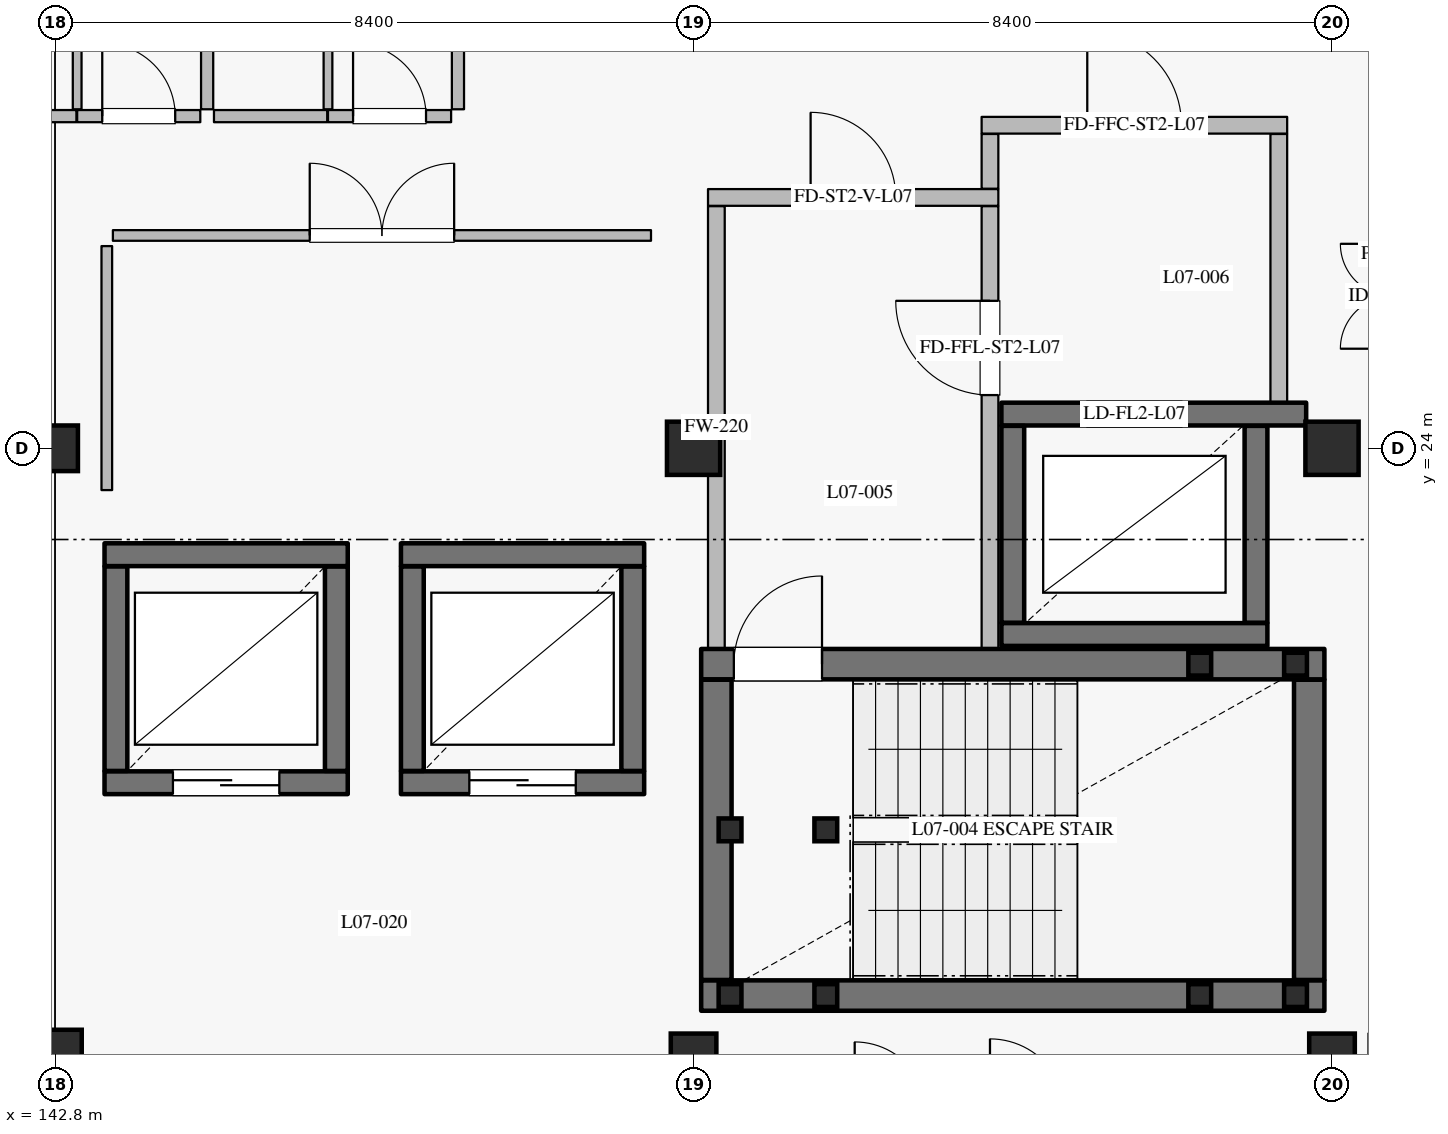
"""IFC4 building model, lengths in metres.
Left out: names, types, materials, properties, quantities, classifications, styles, units other than length and angle.
Written with IfcOpenShell. Run it as: python <this file> out.ifc"""

import sys

from ifc_helpers import new_model, si_unit, direction, frame, frame_2d, origin, origin_2d, place, context, subcontext, project, spatial, rectangle, hollow_rectangle, extrude, element, fill, save


model = new_model("IFC4")
c1 = context("Model", 3, precision=1e-05, world=origin(), true_north=direction((0.0, 1.0)))
c2 = subcontext(c1, "Body", "Model", "MODEL_VIEW")
j1 = project(units=[si_unit("LENGTHUNIT", "METRE"), si_unit("PLANEANGLEUNIT", "RADIAN")], contexts=[c1])
p1 = place(None, origin())
s1 = spatial("IfcSite", under=j1, at=p1, CompositionType="ELEMENT")
p2 = place(p1, origin())
s2 = spatial("IfcBuilding", under=s1, at=p2, CompositionType="ELEMENT")
p3 = place(p2, frame((0.0, 0.0, 32.4)))
s3 = spatial("IfcBuildingStorey", under=s2, at=p3, CompositionType="ELEMENT", Elevation=32.4)
for number, where, z_axis, x_axis in (
    (1, (142.8, 16.0, 0.0), (0.0, 0.0, 1.0), (1.0, 0.0, 0.0)),
    (2, (151.2, 24.0, 0.0), (0.0, 0.0, 1.0), (1.0, 0.0, 0.0)),
    (3, (159.6, 24.0, 0.0), (0.0, 0.0, 1.0), (1.0, 0.0, 0.0)),
):
    element("IfcColumn", number, at=place(p3, frame(where, z_axis=z_axis, x_axis=x_axis)), inside=s3, PredefinedType="COLUMN", context=c2, shape_type="SweptSolid", body=[
        extrude(rectangle(XDim=0.7, YDim=0.7, at=origin_2d()), origin(), (0.0, 0.0, 1.0), 3.6),
    ])
for number, where, z_axis, x_axis in (
    (4, (142.8, 24.0, 0.0), (0.0, 0.0, 1.0), (1.0, 0.0, 0.0)),
    (5, (151.2, 16.0, 0.0), (0.0, 0.0, 1.0), (1.0, 0.0, 0.0)),
    (6, (159.6, 16.0, 0.0), (0.0, 0.0, 1.0), (1.0, 0.0, 0.0)),
):
    element("IfcColumn", number, at=place(p3, frame(where, z_axis=z_axis, x_axis=x_axis)), inside=s3, PredefinedType="COLUMN", context=c2, shape_type="SweptSolid", body=[
        extrude(rectangle(XDim=0.6, YDim=0.6, at=origin_2d()), origin(), (0.0, 0.0, 1.0), 3.6),
    ])
p4 = place(p3, frame((155.25, 21.55, 0.0), z_axis=(0.0, 0.0, 1.0), x_axis=(1.0, 0.0, 0.0)))
e7 = element("IfcWall", 7, at=p4, inside=s3, PredefinedType="SHEAR", context=c2, shape_type="SweptSolid", body=[
    extrude(rectangle(XDim=3.5, YDim=0.3, at=frame_2d((1.75, 0.0))), origin(), (0.0, 0.0, 1.0), 3.335),
])
p5 = place(p3, frame((158.6, 21.705, 0.0), z_axis=(0.0, 0.0, 1.0), x_axis=(0.0, 1.0, 0.0)))
e8 = element("IfcWall", 8, at=p5, inside=s3, PredefinedType="SHEAR", context=c2, shape_type="SweptSolid", body=[
    extrude(rectangle(XDim=2.59, YDim=0.3, at=frame_2d((1.295, 0.0))), origin(), (0.0, 0.0, 1.0), 3.335),
])
p6 = place(p3, frame((159.26, 24.45, 0.0), z_axis=(0.0, 0.0, 1.0), x_axis=(-1.0, 0.0, 0.0)))
e9 = element("IfcWall", 9, at=p6, inside=s3, PredefinedType="SHEAR", context=c2, shape_type="SweptSolid", body=[
    extrude(rectangle(XDim=4.01, YDim=0.3, at=frame_2d((2.005, 0.0))), origin(), (0.0, 0.0, 1.0), 3.335),
])
p7 = place(p6, frame((1.635, 0.0, 0.0)))
e10 = element("IfcOpeningElement", 10, at=p7, cuts=e9, PredefinedType="OPENING", context=c2, shape_type="SweptSolid", body=[
    extrude(rectangle(XDim=1.25, YDim=2.25, at=frame_2d((0.625, 1.125))), frame((0.0, 0.16, 0.0), z_axis=(0.0, -1.0, 0.0), x_axis=(1.0, 0.0, 0.0)), (0.0, 0.0, 1.0), 0.32),
])
p8 = place(p3, frame((155.4, 24.295, 0.0), z_axis=(0.0, 0.0, 1.0), x_axis=(0.0, -1.0, 0.0)))
e11 = element("IfcWall", 11, at=p8, inside=s3, PredefinedType="SHEAR", context=c2, shape_type="SweptSolid", body=[
    extrude(rectangle(XDim=2.59, YDim=0.3, at=frame_2d((1.295, 0.0))), origin(), (0.0, 0.0, 1.0), 3.335),
])
p9 = place(p3, frame((143.45, 19.6, 0.0), z_axis=(0.0, 0.0, 1.0), x_axis=(1.0, 0.0, 0.0)))
e12 = element("IfcWall", 12, at=p9, inside=s3, PredefinedType="SHEAR", context=c2, shape_type="SweptSolid", body=[
    extrude(rectangle(XDim=3.2, YDim=0.3, at=frame_2d((1.6, 0.0))), origin(), (0.0, 0.0, 1.0), 3.335),
])
p10 = place(p9, frame((0.9, 0.0, 0.0)))
e13 = element("IfcOpeningElement", 13, at=p10, cuts=e12, PredefinedType="OPENING", context=c2, shape_type="SweptSolid", body=[
    extrude(rectangle(XDim=1.4, YDim=2.35, at=frame_2d((0.7, 1.175))), frame((0.0, 0.16, 0.0), z_axis=(0.0, -1.0, 0.0), x_axis=(1.0, 0.0, 0.0)), (0.0, 0.0, 1.0), 0.32),
])
p11 = place(p3, frame((146.5, 19.755, 0.0), z_axis=(0.0, 0.0, 1.0), x_axis=(0.0, 1.0, 0.0)))
e14 = element("IfcWall", 14, at=p11, inside=s3, PredefinedType="SHEAR", context=c2, shape_type="SweptSolid", body=[
    extrude(rectangle(XDim=2.69, YDim=0.3, at=frame_2d((1.345, 0.0))), origin(), (0.0, 0.0, 1.0), 3.335),
])
p12 = place(p3, frame((146.65, 22.6, 0.0), z_axis=(0.0, 0.0, 1.0), x_axis=(-1.0, 0.0, 0.0)))
e15 = element("IfcWall", 15, at=p12, inside=s3, PredefinedType="SHEAR", context=c2, shape_type="SweptSolid", body=[
    extrude(rectangle(XDim=3.2, YDim=0.3, at=frame_2d((1.6, 0.0))), origin(), (0.0, 0.0, 1.0), 3.335),
])
p13 = place(p3, frame((143.6, 22.445, 0.0), z_axis=(0.0, 0.0, 1.0), x_axis=(0.0, -1.0, 0.0)))
e16 = element("IfcWall", 16, at=p13, inside=s3, PredefinedType="SHEAR", context=c2, shape_type="SweptSolid", body=[
    extrude(rectangle(XDim=2.69, YDim=0.3, at=frame_2d((1.345, 0.0))), origin(), (0.0, 0.0, 1.0), 3.335),
])
p14 = place(p3, frame((147.35, 19.6, 0.0), z_axis=(0.0, 0.0, 1.0), x_axis=(1.0, 0.0, 0.0)))
e17 = element("IfcWall", 17, at=p14, inside=s3, PredefinedType="SHEAR", context=c2, shape_type="SweptSolid", body=[
    extrude(rectangle(XDim=3.2, YDim=0.3, at=frame_2d((1.6, 0.0))), origin(), (0.0, 0.0, 1.0), 3.335),
])
p15 = place(p14, frame((0.9, 0.0, 0.0)))
e18 = element("IfcOpeningElement", 18, at=p15, cuts=e17, PredefinedType="OPENING", context=c2, shape_type="SweptSolid", body=[
    extrude(rectangle(XDim=1.4, YDim=2.35, at=frame_2d((0.7, 1.175))), frame((0.0, 0.16, 0.0), z_axis=(0.0, -1.0, 0.0), x_axis=(1.0, 0.0, 0.0)), (0.0, 0.0, 1.0), 0.32),
])
p16 = place(p3, frame((150.4, 19.755, 0.0), z_axis=(0.0, 0.0, 1.0), x_axis=(0.0, 1.0, 0.0)))
e19 = element("IfcWall", 19, at=p16, inside=s3, PredefinedType="SHEAR", context=c2, shape_type="SweptSolid", body=[
    extrude(rectangle(XDim=2.69, YDim=0.3, at=frame_2d((1.345, 0.0))), origin(), (0.0, 0.0, 1.0), 3.335),
])
p17 = place(p3, frame((150.55, 22.6, 0.0), z_axis=(0.0, 0.0, 1.0), x_axis=(-1.0, 0.0, 0.0)))
e20 = element("IfcWall", 20, at=p17, inside=s3, PredefinedType="SHEAR", context=c2, shape_type="SweptSolid", body=[
    extrude(rectangle(XDim=3.2, YDim=0.3, at=frame_2d((1.6, 0.0))), origin(), (0.0, 0.0, 1.0), 3.335),
])
p18 = place(p3, frame((147.5, 22.445, 0.0), z_axis=(0.0, 0.0, 1.0), x_axis=(0.0, -1.0, 0.0)))
e21 = element("IfcWall", 21, at=p18, inside=s3, PredefinedType="SHEAR", context=c2, shape_type="SweptSolid", body=[
    extrude(rectangle(XDim=2.69, YDim=0.3, at=frame_2d((1.345, 0.0))), origin(), (0.0, 0.0, 1.0), 3.335),
])
p19 = place(p3, frame((151.3, 16.8, 0.0), z_axis=(0.0, 0.0, 1.0), x_axis=(1.0, 0.0, 0.0)))
e22 = element("IfcWall", 22, at=p19, inside=s3, PredefinedType="SHEAR", context=c2, shape_type="SweptSolid", body=[
    extrude(rectangle(XDim=8.2, YDim=0.4, at=frame_2d((4.1, 0.0))), origin(), (0.0, 0.0, 1.0), 3.335),
])
p20 = place(p3, frame((159.3, 17.005, 0.0), z_axis=(0.0, 0.0, 1.0), x_axis=(0.0, 1.0, 0.0)))
e23 = element("IfcWall", 23, at=p20, inside=s3, PredefinedType="SHEAR", context=c2, shape_type="SweptSolid", body=[
    extrude(rectangle(XDim=3.95, YDim=0.4, at=frame_2d((1.975, 0.0))), origin(), (0.0, 0.0, 1.0), 3.335),
])
p21 = place(p3, frame((151.3, 21.16, 0.0), z_axis=(0.0, 0.0, 1.0), x_axis=(1.0, 0.0, 0.0)))
e24 = element("IfcWall", 24, at=p21, inside=s3, PredefinedType="SHEAR", context=c2, shape_type="SweptSolid", body=[
    extrude(rectangle(XDim=8.2, YDim=0.4, at=frame_2d((4.1, 0.0))), origin(), (0.0, 0.0, 1.0), 3.335),
])
p22 = place(p21, frame((0.43, 0.0, 0.0)))
e25 = element("IfcOpeningElement", 25, at=p22, cuts=e24, PredefinedType="OPENING", context=c2, shape_type="SweptSolid", body=[
    extrude(rectangle(XDim=1.16, YDim=2.2, at=frame_2d((0.58, 1.1))), frame((0.0, 0.21, 0.0), z_axis=(0.0, -1.0, 0.0), x_axis=(1.0, 0.0, 0.0)), (0.0, 0.0, 1.0), 0.42),
])
p23 = place(p3, frame((151.5, 17.005, 0.0), z_axis=(0.0, 0.0, 1.0), x_axis=(0.0, 1.0, 0.0)))
e26 = element("IfcWall", 26, at=p23, inside=s3, PredefinedType="SHEAR", context=c2, shape_type="SweptSolid", body=[
    extrude(rectangle(XDim=3.95, YDim=0.4, at=frame_2d((1.975, 0.0))), origin(), (0.0, 0.0, 1.0), 3.335),
])
p24 = place(p3, frame((151.5, 21.365, 0.0), z_axis=(0.0, 0.0, 1.0), x_axis=(0.0, 1.0, 0.0)))
e27 = element("IfcWall", 27, at=p24, inside=s3, PredefinedType="PARTITIONING", context=c2, shape_type="SweptSolid", body=[
    extrude(rectangle(XDim=5.82, YDim=0.22, at=frame_2d((2.91, 0.0))), origin(), (0.0, 0.0, 1.0), 3.335),
])
p25 = place(p3, frame((151.39, 27.3, 0.0), z_axis=(0.0, 0.0, 1.0), x_axis=(1.0, 0.0, 0.0)))
e28 = element("IfcWall", 28, at=p25, inside=s3, PredefinedType="PARTITIONING", context=c2, shape_type="SweptSolid", body=[
    extrude(rectangle(XDim=3.82, YDim=0.22, at=frame_2d((1.91, 0.0))), origin(), (0.0, 0.0, 1.0), 3.335),
])
p26 = place(p25, frame((1.35, 0.0, 0.0)))
e29 = element("IfcOpeningElement", 29, at=p26, cuts=e28, PredefinedType="OPENING", context=c2, shape_type="SweptSolid", body=[
    extrude(rectangle(XDim=1.12, YDim=2.2, at=frame_2d((0.56, 1.1))), frame((0.0, 0.12, 0.0), z_axis=(0.0, -1.0, 0.0), x_axis=(1.0, 0.0, 0.0)), (0.0, 0.0, 1.0), 0.24),
])
p27 = place(p3, frame((155.1, 21.365, 0.0), z_axis=(0.0, 0.0, 1.0), x_axis=(0.0, 1.0, 0.0)))
e30 = element("IfcWall", 30, at=p27, inside=s3, PredefinedType="PARTITIONING", context=c2, shape_type="SweptSolid", body=[
    extrude(rectangle(XDim=5.82, YDim=0.22, at=frame_2d((2.91, 0.0))), origin(), (0.0, 0.0, 1.0), 3.335),
])
p28 = place(p27, frame((3.335, 0.0, 0.0)))
e31 = element("IfcOpeningElement", 31, at=p28, cuts=e30, PredefinedType="OPENING", context=c2, shape_type="SweptSolid", body=[
    extrude(rectangle(XDim=1.24, YDim=2.2, at=frame_2d((0.62, 1.1))), frame((0.0, 0.12, 0.0), z_axis=(0.0, -1.0, 0.0), x_axis=(1.0, 0.0, 0.0)), (0.0, 0.0, 1.0), 0.24),
])
p29 = place(p3, frame((155.1, 27.415, 0.0), z_axis=(0.0, 0.0, 1.0), x_axis=(0.0, 1.0, 0.0)))
e32 = element("IfcWall", 32, at=p29, inside=s3, PredefinedType="PARTITIONING", context=c2, shape_type="SweptSolid", body=[
    extrude(rectangle(XDim=0.72, YDim=0.22, at=frame_2d((0.36, 0.0))), origin(), (0.0, 0.0, 1.0), 3.335),
])
p30 = place(p3, frame((158.9, 24.605, 0.0), z_axis=(0.0, 0.0, 1.0), x_axis=(0.0, 1.0, 0.0)))
e33 = element("IfcWall", 33, at=p30, inside=s3, PredefinedType="PARTITIONING", context=c2, shape_type="SweptSolid", body=[
    extrude(rectangle(XDim=3.53, YDim=0.22, at=frame_2d((1.765, 0.0))), origin(), (0.0, 0.0, 1.0), 3.335),
])
p31 = place(p3, frame((154.99, 28.25, 0.0), z_axis=(0.0, 0.0, 1.0), x_axis=(1.0, 0.0, 0.0)))
e34 = element("IfcWall", 34, at=p31, inside=s3, PredefinedType="PARTITIONING", context=c2, shape_type="SweptSolid", body=[
    extrude(rectangle(XDim=4.02, YDim=0.22, at=frame_2d((2.01, 0.0))), origin(), (0.0, 0.0, 1.0), 3.335),
])
p32 = place(p31, frame((1.39, 0.0, 0.0)))
e35 = element("IfcOpeningElement", 35, at=p32, cuts=e34, PredefinedType="OPENING", context=c2, shape_type="SweptSolid", body=[
    extrude(rectangle(XDim=1.24, YDim=2.2, at=frame_2d((0.62, 1.1))), frame((0.0, 0.12, 0.0), z_axis=(0.0, -1.0, 0.0), x_axis=(1.0, 0.0, 0.0)), (0.0, 0.0, 1.0), 0.24),
])
for number, where, z_axis, x_axis in (
    (36, (151.68, 16.8, 0.0), (0.0, 0.0, 1.0), (1.0, 0.0, 0.0)),
    (37, (151.68, 18.98, 0.0), (0.0, 0.0, 1.0), (1.0, 0.0, 0.0)),
    (38, (152.94, 16.8, 0.0), (0.0, 0.0, 1.0), (1.0, 0.0, 0.0)),
    (39, (152.94, 18.98, 0.0), (0.0, 0.0, 1.0), (1.0, 0.0, 0.0)),
):
    element("IfcColumn", number, at=place(p3, frame(where, z_axis=z_axis, x_axis=x_axis)), inside=s3, PredefinedType="COLUMN", context=c2, shape_type="SweptSolid", body=[
        extrude(hollow_rectangle(XDim=0.3, YDim=0.3, WallThickness=0.012, at=origin_2d()), origin(), (0.0, 0.0, 1.0), 3.42),
    ])
for number, where, z_axis, x_axis in (
    (40, (157.86, 16.8, -1.8), (0.0, 0.0, 1.0), (1.0, 0.0, 0.0)),
    (41, (157.86, 21.16, -1.8), (0.0, 0.0, 1.0), (1.0, 0.0, 0.0)),
    (42, (159.12, 16.8, -1.8), (0.0, 0.0, 1.0), (1.0, 0.0, 0.0)),
    (43, (159.12, 21.16, -1.8), (0.0, 0.0, 1.0), (1.0, 0.0, 0.0)),
):
    element("IfcColumn", number, at=place(p3, frame(where, z_axis=z_axis, x_axis=x_axis)), inside=s3, PredefinedType="COLUMN", context=c2, shape_type="SweptSolid", body=[
        extrude(hollow_rectangle(XDim=0.3, YDim=0.3, WallThickness=0.012, at=origin_2d()), origin(), (0.0, 0.0, 1.0), 3.42),
    ])
p33 = place(p3, frame((141.59, 28.37, 0.0), z_axis=(0.0, 0.0, 1.0), x_axis=(1.0, 0.0, 0.0)))
e44 = element("IfcWall", 44, at=p33, inside=s3, PredefinedType="PARTITIONING", context=c2, shape_type="SweptSolid", body=[
    extrude(rectangle(XDim=1.49, YDim=0.16, at=frame_2d((0.745, 0.0))), origin(), (0.0, 0.0, 1.0), 3.335),
])
p34 = place(p3, frame((143.09, 28.37, 0.0), z_axis=(0.0, 0.0, 1.0), x_axis=(1.0, 0.0, 0.0)))
e45 = element("IfcWall", 45, at=p34, inside=s3, PredefinedType="PARTITIONING", context=c2, shape_type="SweptSolid", body=[
    extrude(rectangle(XDim=1.62, YDim=0.16, at=frame_2d((0.81, 0.0))), origin(), (0.0, 0.0, 1.0), 3.335),
])
p35 = place(p34, frame((0.33, 0.0, 0.0)))
e46 = element("IfcOpeningElement", 46, at=p35, cuts=e45, PredefinedType="OPENING", context=c2, shape_type="SweptSolid", body=[
    extrude(rectangle(XDim=0.96, YDim=2.2, at=frame_2d((0.48, 1.1))), frame((0.0, 0.09, 0.0), z_axis=(0.0, -1.0, 0.0), x_axis=(1.0, 0.0, 0.0)), (0.0, 0.0, 1.0), 0.18),
])
p36 = place(p3, frame((143.09, 28.46, 0.0), z_axis=(0.0, 0.0, 1.0), x_axis=(0.0, 1.0, 0.0)))
e47 = element("IfcWall", 47, at=p36, inside=s3, PredefinedType="PARTITIONING", context=c2, shape_type="SweptSolid", body=[
    extrude(rectangle(XDim=1.74, YDim=0.115, at=frame_2d((0.87, 0.0))), origin(), (0.0, 0.0, 1.0), 3.335),
])
p37 = place(p3, frame((144.89, 28.37, 0.0), z_axis=(0.0, 0.0, 1.0), x_axis=(1.0, 0.0, 0.0)))
e48 = element("IfcWall", 48, at=p37, inside=s3, PredefinedType="PARTITIONING", context=c2, shape_type="SweptSolid", body=[
    extrude(rectangle(XDim=1.49, YDim=0.16, at=frame_2d((0.745, 0.0))), origin(), (0.0, 0.0, 1.0), 3.335),
])
p38 = place(p3, frame((146.39, 28.37, 0.0), z_axis=(0.0, 0.0, 1.0), x_axis=(1.0, 0.0, 0.0)))
e49 = element("IfcWall", 49, at=p38, inside=s3, PredefinedType="PARTITIONING", context=c2, shape_type="SweptSolid", body=[
    extrude(rectangle(XDim=1.62, YDim=0.16, at=frame_2d((0.81, 0.0))), origin(), (0.0, 0.0, 1.0), 3.335),
])
p39 = place(p38, frame((0.33, 0.0, 0.0)))
e50 = element("IfcOpeningElement", 50, at=p39, cuts=e49, PredefinedType="OPENING", context=c2, shape_type="SweptSolid", body=[
    extrude(rectangle(XDim=0.96, YDim=2.2, at=frame_2d((0.48, 1.1))), frame((0.0, 0.09, 0.0), z_axis=(0.0, -1.0, 0.0), x_axis=(1.0, 0.0, 0.0)), (0.0, 0.0, 1.0), 0.18),
])
p40 = place(p3, frame((146.39, 28.46, 0.0), z_axis=(0.0, 0.0, 1.0), x_axis=(0.0, 1.0, 0.0)))
e51 = element("IfcWall", 51, at=p40, inside=s3, PredefinedType="PARTITIONING", context=c2, shape_type="SweptSolid", body=[
    extrude(rectangle(XDim=2.45, YDim=0.115, at=frame_2d((1.225, 0.0))), origin(), (0.0, 0.0, 1.0), 3.335),
])
p41 = place(p3, frame((144.8, 28.46, 0.0), z_axis=(0.0, 0.0, 1.0), x_axis=(0.0, 1.0, 0.0)))
e52 = element("IfcWall", 52, at=p41, inside=s3, PredefinedType="PARTITIONING", context=c2, shape_type="SweptSolid", body=[
    extrude(rectangle(XDim=5.1, YDim=0.16, at=frame_2d((2.55, 0.0))), origin(), (0.0, 0.0, 1.0), 3.335),
])
p42 = place(p3, frame((148.1, 28.46, 0.0), z_axis=(0.0, 0.0, 1.0), x_axis=(0.0, 1.0, 0.0)))
e53 = element("IfcWall", 53, at=p42, inside=s3, PredefinedType="PARTITIONING", context=c2, shape_type="SweptSolid", body=[
    extrude(rectangle(XDim=4.44, YDim=0.16, at=frame_2d((2.22, 0.0))), origin(), (0.0, 0.0, 1.0), 3.335),
])
p43 = place(p3, frame((143.56, 26.8, 0.0), z_axis=(0.0, 0.0, 1.0), x_axis=(1.0, 0.0, 0.0)))
e54 = element("IfcWall", 54, at=p43, inside=s3, PredefinedType="PARTITIONING", context=c2, shape_type="SweptSolid", body=[
    extrude(rectangle(XDim=7.08, YDim=0.14, at=frame_2d((3.54, 0.0))), origin(), (0.0, 0.0, 1.0), 3.335),
])
p44 = place(p43, frame((2.59, 0.0, 0.0)))
e55 = element("IfcOpeningElement", 55, at=p44, cuts=e54, PredefinedType="OPENING", context=c2, shape_type="SweptSolid", body=[
    extrude(rectangle(XDim=1.9, YDim=2.4, at=frame_2d((0.95, 1.2))), frame((0.0, 0.08, 0.0), z_axis=(0.0, -1.0, 0.0), x_axis=(1.0, 0.0, 0.0)), (0.0, 0.0, 1.0), 0.16),
])
p45 = place(p3, frame((143.48, 23.45, 0.0), z_axis=(0.0, 0.0, 1.0), x_axis=(0.0, 1.0, 0.0)))
e56 = element("IfcWall", 56, at=p45, inside=s3, PredefinedType="PARTITIONING", context=c2, shape_type="SweptSolid", body=[
    extrude(rectangle(XDim=3.21, YDim=0.14, at=frame_2d((1.605, 0.0))), origin(), (0.0, 0.0, 1.0), 3.335),
])
p46 = place(p7, origin())
e57 = element("IfcDoor", 57, at=p46, inside=s3, OperationType="DOUBLE_DOOR_SLIDING", PredefinedType="DOOR", context=c2, shape_type="SweptSolid", body=[
    extrude(rectangle(XDim=1.25, YDim=2.25, at=frame_2d((0.625, 1.125))), frame((0.0, 0.025, 0.0), z_axis=(0.0, -1.0, 0.0), x_axis=(1.0, 0.0, 0.0)), (0.0, 0.0, 1.0), 0.05),
])
fill(e10, e57)
p47 = place(p10, origin())
e58 = element("IfcDoor", 58, at=p47, inside=s3, OperationType="DOUBLE_DOOR_SLIDING", PredefinedType="DOOR", context=c2, shape_type="SweptSolid", body=[
    extrude(rectangle(XDim=1.4, YDim=2.35, at=frame_2d((0.7, 1.175))), frame((0.0, 0.025, 0.0), z_axis=(0.0, -1.0, 0.0), x_axis=(1.0, 0.0, 0.0)), (0.0, 0.0, 1.0), 0.05),
])
fill(e13, e58)
p48 = place(p15, origin())
e59 = element("IfcDoor", 59, at=p48, inside=s3, OperationType="DOUBLE_DOOR_SLIDING", PredefinedType="DOOR", context=c2, shape_type="SweptSolid", body=[
    extrude(rectangle(XDim=1.4, YDim=2.35, at=frame_2d((0.7, 1.175))), frame((0.0, 0.025, 0.0), z_axis=(0.0, -1.0, 0.0), x_axis=(1.0, 0.0, 0.0)), (0.0, 0.0, 1.0), 0.05),
])
fill(e18, e59)
p49 = place(p22, origin())
e60 = element("IfcDoor", 60, at=p49, inside=s3, OperationType="SINGLE_SWING_RIGHT", PredefinedType="DOOR", context=c2, shape_type="SweptSolid", body=[
    extrude(rectangle(XDim=1.16, YDim=2.2, at=frame_2d((0.58, 1.1))), frame((0.0, 0.025, 0.0), z_axis=(0.0, -1.0, 0.0), x_axis=(1.0, 0.0, 0.0)), (0.0, 0.0, 1.0), 0.05),
])
fill(e25, e60)
p50 = place(p26, origin())
e61 = element("IfcDoor", 61, at=p50, inside=s3, OperationType="SINGLE_SWING_LEFT", PredefinedType="DOOR", context=c2, shape_type="SweptSolid", body=[
    extrude(rectangle(XDim=1.12, YDim=2.2, at=frame_2d((0.56, 1.1))), frame((0.0, 0.025, 0.0), z_axis=(0.0, -1.0, 0.0), x_axis=(1.0, 0.0, 0.0)), (0.0, 0.0, 1.0), 0.05),
])
fill(e29, e61)
p51 = place(p28, origin())
e62 = element("IfcDoor", 62, at=p51, inside=s3, OperationType="SINGLE_SWING_RIGHT", PredefinedType="DOOR", context=c2, shape_type="SweptSolid", body=[
    extrude(rectangle(XDim=1.24, YDim=2.2, at=frame_2d((0.62, 1.1))), frame((0.0, 0.025, 0.0), z_axis=(0.0, -1.0, 0.0), x_axis=(1.0, 0.0, 0.0)), (0.0, 0.0, 1.0), 0.05),
])
fill(e31, e62)
p52 = place(p32, origin())
e63 = element("IfcDoor", 63, at=p52, inside=s3, OperationType="SINGLE_SWING_LEFT", PredefinedType="DOOR", context=c2, shape_type="SweptSolid", body=[
    extrude(rectangle(XDim=1.24, YDim=2.2, at=frame_2d((0.62, 1.1))), frame((0.0, 0.025, 0.0), z_axis=(0.0, -1.0, 0.0), x_axis=(1.0, 0.0, 0.0)), (0.0, 0.0, 1.0), 0.05),
])
fill(e35, e63)
p53 = place(p35, origin())
e64 = element("IfcDoor", 64, at=p53, inside=s3, OperationType="SINGLE_SWING_LEFT", PredefinedType="DOOR", context=c2, shape_type="SweptSolid", body=[
    extrude(rectangle(XDim=0.96, YDim=2.2, at=frame_2d((0.48, 1.1))), frame((0.0, 0.025, 0.0), z_axis=(0.0, -1.0, 0.0), x_axis=(1.0, 0.0, 0.0)), (0.0, 0.0, 1.0), 0.05),
])
fill(e46, e64)
p54 = place(p39, origin())
e65 = element("IfcDoor", 65, at=p54, inside=s3, OperationType="SINGLE_SWING_LEFT", PredefinedType="DOOR", context=c2, shape_type="SweptSolid", body=[
    extrude(rectangle(XDim=0.96, YDim=2.2, at=frame_2d((0.48, 1.1))), frame((0.0, 0.025, 0.0), z_axis=(0.0, -1.0, 0.0), x_axis=(1.0, 0.0, 0.0)), (0.0, 0.0, 1.0), 0.05),
])
fill(e50, e65)
p55 = place(p44, origin())
e66 = element("IfcDoor", 66, at=p55, inside=s3, OperationType="DOUBLE_DOOR_SINGLE_SWING", PredefinedType="DOOR", context=c2, shape_type="SweptSolid", body=[
    extrude(rectangle(XDim=1.9, YDim=2.4, at=frame_2d((0.95, 1.2))), frame((0.0, 0.025, 0.0), z_axis=(0.0, -1.0, 0.0), x_axis=(1.0, 0.0, 0.0)), (0.0, 0.0, 1.0), 0.05),
])
fill(e55, e66)
save(model, sys.argv[1])
